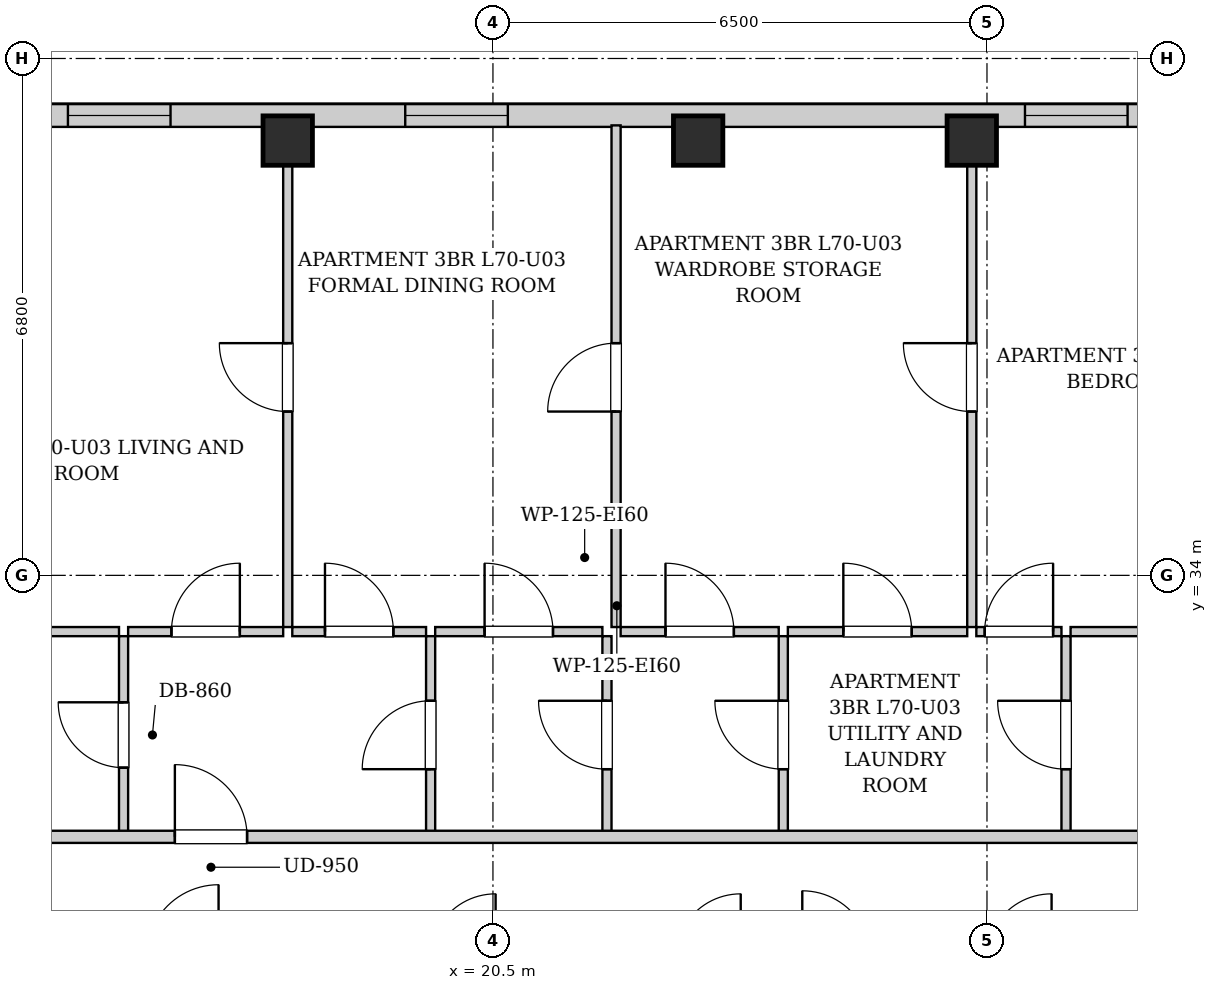
"""IFC4 building model, lengths in metres.
Left out: names, types, materials, properties, quantities, classifications, styles, units other than length and angle.
Written with IfcOpenShell. Run it as: python <this file> out.ifc"""

import sys

from ifc_helpers import new_model, si_unit, direction, frame, frame_2d, origin, origin_2d, place, context, subcontext, project, spatial, rectangle, extrude, element, fill, save


model = new_model("IFC4")
c1 = context("Model", 3, precision=1e-05, world=origin(), true_north=direction((0.0, 1.0)))
c2 = subcontext(c1, "Body", "Model", "MODEL_VIEW")
j1 = project(units=[si_unit("LENGTHUNIT", "METRE"), si_unit("PLANEANGLEUNIT", "RADIAN")], contexts=[c1])
p1 = place(None, origin())
s1 = spatial("IfcSite", under=j1, at=p1, CompositionType="ELEMENT")
p2 = place(p1, origin())
s2 = spatial("IfcBuilding", under=s1, at=p2, CompositionType="ELEMENT")
p3 = place(p2, frame((0.0, 0.0, 241.1)))
s3 = spatial("IfcBuildingStorey", under=s2, at=p3, CompositionType="ELEMENT", Elevation=241.1)
for number, where, z_axis, x_axis in (
    (1, (17.8, 39.72, 0.0), (0.0, 0.0, 1.0), (1.0, 0.0, 0.0)),
    (2, (23.2, 39.72, 0.0), (0.0, 0.0, 1.0), (1.0, 0.0, 0.0)),
    (3, (26.8, 39.72, 0.0), (0.0, 0.0, 1.0), (1.0, 0.0, 0.0)),
):
    element("IfcColumn", number, at=place(p3, frame(where, z_axis=z_axis, x_axis=x_axis)), inside=s3, PredefinedType="COLUMN", context=c2, shape_type="SweptSolid", body=[
        extrude(rectangle(XDim=0.65, YDim=0.65, at=origin_2d()), origin(), (0.0, 0.0, 1.0), 3.4),
    ])
p4 = place(p3, frame((13.1, 40.05, 0.0), z_axis=(0.0, 0.0, 1.0), x_axis=(1.0, 0.0, 0.0)))
e4 = element("IfcWall", 4, at=p4, inside=s3, PredefinedType="SOLIDWALL", context=c2, shape_type="SweptSolid", body=[
    extrude(rectangle(XDim=16.4, YDim=0.3, at=frame_2d((8.2, 0.0))), origin(), (0.0, 0.0, 1.0), 3.14),
])
p5 = place(p4, frame((1.808, 0.0, 0.55)))
e5 = element("IfcOpeningElement", 5, at=p5, cuts=e4, PredefinedType="OPENING", context=c2, shape_type="SweptSolid", body=[
    extrude(rectangle(XDim=1.35, YDim=1.2, at=frame_2d((0.675, 0.6))), frame((0.0, 0.16, 0.0), z_axis=(0.0, -1.0, 0.0), x_axis=(1.0, 0.0, 0.0)), (0.0, 0.0, 1.0), 0.32),
])
p6 = place(p4, frame((6.246, 0.0, 0.55)))
e6 = element("IfcOpeningElement", 6, at=p6, cuts=e4, PredefinedType="OPENING", context=c2, shape_type="SweptSolid", body=[
    extrude(rectangle(XDim=1.35, YDim=1.2, at=frame_2d((0.675, 0.6))), frame((0.0, 0.16, 0.0), z_axis=(0.0, -1.0, 0.0), x_axis=(1.0, 0.0, 0.0)), (0.0, 0.0, 1.0), 0.32),
])
p7 = place(p4, frame((14.4, 0.0, 0.55)))
e7 = element("IfcOpeningElement", 7, at=p7, cuts=e4, PredefinedType="OPENING", context=c2, shape_type="SweptSolid", body=[
    extrude(rectangle(XDim=1.35, YDim=1.2, at=frame_2d((0.675, 0.6))), frame((0.0, 0.16, 0.0), z_axis=(0.0, -1.0, 0.0), x_axis=(1.0, 0.0, 0.0)), (0.0, 0.0, 1.0), 0.32),
])
p8 = place(p3, frame((15.64, 30.6, 0.0), z_axis=(0.0, 0.0, 1.0), x_axis=(0.0, 1.0, 0.0)))
e8 = element("IfcWall", 8, at=p8, inside=s3, PredefinedType="PARTITIONING", context=c2, shape_type="SweptSolid", body=[
    extrude(rectangle(XDim=2.6, YDim=0.12, at=frame_2d((1.3, 0.0))), origin(), (0.0, 0.0, 1.0), 3.14),
])
p9 = place(p8, frame((0.87, 0.0, 0.0)))
e9 = element("IfcOpeningElement", 9, at=p9, cuts=e8, PredefinedType="OPENING", context=c2, shape_type="SweptSolid", body=[
    extrude(rectangle(XDim=0.86, YDim=2.05, at=frame_2d((0.43, 1.025))), frame((0.0, 0.07, 0.0), z_axis=(0.0, -1.0, 0.0), x_axis=(1.0, 0.0, 0.0)), (0.0, 0.0, 1.0), 0.14),
])
p10 = place(p3, frame((13.18, 33.26, 0.0), z_axis=(0.0, 0.0, 1.0), x_axis=(1.0, 0.0, 0.0)))
e10 = element("IfcWall", 10, at=p10, inside=s3, PredefinedType="PARTITIONING", context=c2, shape_type="SweptSolid", body=[
    extrude(rectangle(XDim=2.4, YDim=0.12, at=frame_2d((1.2, 0.0))), origin(), (0.0, 0.0, 1.0), 3.14),
])
p11 = place(p3, frame((19.68, 30.6, 0.0), z_axis=(0.0, 0.0, 1.0), x_axis=(0.0, 1.0, 0.0)))
e11 = element("IfcWall", 11, at=p11, inside=s3, PredefinedType="PARTITIONING", context=c2, shape_type="SweptSolid", body=[
    extrude(rectangle(XDim=2.6, YDim=0.12, at=frame_2d((1.3, 0.0))), origin(), (0.0, 0.0, 1.0), 3.14),
])
p12 = place(p11, frame((0.85, 0.0, 0.0)))
e12 = element("IfcOpeningElement", 12, at=p12, cuts=e11, PredefinedType="OPENING", context=c2, shape_type="SweptSolid", body=[
    extrude(rectangle(XDim=0.9, YDim=2.05, at=frame_2d((0.45, 1.025))), frame((0.0, 0.07, 0.0), z_axis=(0.0, -1.0, 0.0), x_axis=(1.0, 0.0, 0.0)), (0.0, 0.0, 1.0), 0.14),
])
p13 = place(p3, frame((15.7, 33.26, 0.0), z_axis=(0.0, 0.0, 1.0), x_axis=(1.0, 0.0, 0.0)))
e13 = element("IfcWall", 13, at=p13, inside=s3, PredefinedType="PARTITIONING", context=c2, shape_type="SweptSolid", body=[
    extrude(rectangle(XDim=2.04, YDim=0.12, at=frame_2d((1.02, 0.0))), origin(), (0.0, 0.0, 1.0), 3.14),
])
p14 = place(p13, frame((0.57, 0.0, 0.0)))
e14 = element("IfcOpeningElement", 14, at=p14, cuts=e13, PredefinedType="OPENING", context=c2, shape_type="SweptSolid", body=[
    extrude(rectangle(XDim=0.9, YDim=2.05, at=frame_2d((0.45, 1.025))), frame((0.0, 0.07, 0.0), z_axis=(0.0, -1.0, 0.0), x_axis=(1.0, 0.0, 0.0)), (0.0, 0.0, 1.0), 0.14),
])
p15 = place(p3, frame((17.86, 33.26, 0.0), z_axis=(0.0, 0.0, 1.0), x_axis=(1.0, 0.0, 0.0)))
e15 = element("IfcWall", 15, at=p15, inside=s3, PredefinedType="PARTITIONING", context=c2, shape_type="SweptSolid", body=[
    extrude(rectangle(XDim=1.76, YDim=0.12, at=frame_2d((0.88, 0.0))), origin(), (0.0, 0.0, 1.0), 3.14),
])
p16 = place(p15, frame((0.43, 0.0, 0.0)))
e16 = element("IfcOpeningElement", 16, at=p16, cuts=e15, PredefinedType="OPENING", context=c2, shape_type="SweptSolid", body=[
    extrude(rectangle(XDim=0.9, YDim=2.05, at=frame_2d((0.45, 1.025))), frame((0.0, 0.07, 0.0), z_axis=(0.0, -1.0, 0.0), x_axis=(1.0, 0.0, 0.0)), (0.0, 0.0, 1.0), 0.14),
])
p17 = place(p3, frame((22.0, 30.6, 0.0), z_axis=(0.0, 0.0, 1.0), x_axis=(0.0, 1.0, 0.0)))
e17 = element("IfcWall", 17, at=p17, inside=s3, PredefinedType="PARTITIONING", context=c2, shape_type="SweptSolid", body=[
    extrude(rectangle(XDim=2.6, YDim=0.12, at=frame_2d((1.3, 0.0))), origin(), (0.0, 0.0, 1.0), 3.14),
])
p18 = place(p17, frame((0.85, 0.0, 0.0)))
e18 = element("IfcOpeningElement", 18, at=p18, cuts=e17, PredefinedType="OPENING", context=c2, shape_type="SweptSolid", body=[
    extrude(rectangle(XDim=0.9, YDim=2.05, at=frame_2d((0.45, 1.025))), frame((0.0, 0.07, 0.0), z_axis=(0.0, -1.0, 0.0), x_axis=(1.0, 0.0, 0.0)), (0.0, 0.0, 1.0), 0.14),
])
p19 = place(p3, frame((19.74, 33.26, 0.0), z_axis=(0.0, 0.0, 1.0), x_axis=(1.0, 0.0, 0.0)))
e19 = element("IfcWall", 19, at=p19, inside=s3, PredefinedType="PARTITIONING", context=c2, shape_type="SweptSolid", body=[
    extrude(rectangle(XDim=2.2, YDim=0.12, at=frame_2d((1.1, 0.0))), origin(), (0.0, 0.0, 1.0), 3.14),
])
p20 = place(p19, frame((0.65, 0.0, 0.0)))
e20 = element("IfcOpeningElement", 20, at=p20, cuts=e19, PredefinedType="OPENING", context=c2, shape_type="SweptSolid", body=[
    extrude(rectangle(XDim=0.9, YDim=2.05, at=frame_2d((0.45, 1.025))), frame((0.0, 0.07, 0.0), z_axis=(0.0, -1.0, 0.0), x_axis=(1.0, 0.0, 0.0)), (0.0, 0.0, 1.0), 0.14),
])
p21 = place(p3, frame((24.32, 30.6, 0.0), z_axis=(0.0, 0.0, 1.0), x_axis=(0.0, 1.0, 0.0)))
e21 = element("IfcWall", 21, at=p21, inside=s3, PredefinedType="PARTITIONING", context=c2, shape_type="SweptSolid", body=[
    extrude(rectangle(XDim=2.6, YDim=0.12, at=frame_2d((1.3, 0.0))), origin(), (0.0, 0.0, 1.0), 3.14),
])
p22 = place(p21, frame((0.85, 0.0, 0.0)))
e22 = element("IfcOpeningElement", 22, at=p22, cuts=e21, PredefinedType="OPENING", context=c2, shape_type="SweptSolid", body=[
    extrude(rectangle(XDim=0.9, YDim=2.05, at=frame_2d((0.45, 1.025))), frame((0.0, 0.07, 0.0), z_axis=(0.0, -1.0, 0.0), x_axis=(1.0, 0.0, 0.0)), (0.0, 0.0, 1.0), 0.14),
])
p23 = place(p3, frame((22.18, 33.26, 0.0), z_axis=(0.0, 0.0, 1.0), x_axis=(1.0, 0.0, 0.0)))
e23 = element("IfcWall", 23, at=p23, inside=s3, PredefinedType="PARTITIONING", context=c2, shape_type="SweptSolid", body=[
    extrude(rectangle(XDim=2.08, YDim=0.12, at=frame_2d((1.04, 0.0))), origin(), (0.0, 0.0, 1.0), 3.14),
])
p24 = place(p23, frame((0.59, 0.0, 0.0)))
e24 = element("IfcOpeningElement", 24, at=p24, cuts=e23, PredefinedType="OPENING", context=c2, shape_type="SweptSolid", body=[
    extrude(rectangle(XDim=0.9, YDim=2.05, at=frame_2d((0.45, 1.025))), frame((0.0, 0.07, 0.0), z_axis=(0.0, -1.0, 0.0), x_axis=(1.0, 0.0, 0.0)), (0.0, 0.0, 1.0), 0.14),
])
p25 = place(p3, frame((28.04, 30.6, 0.0), z_axis=(0.0, 0.0, 1.0), x_axis=(0.0, 1.0, 0.0)))
e25 = element("IfcWall", 25, at=p25, inside=s3, PredefinedType="PARTITIONING", context=c2, shape_type="SweptSolid", body=[
    extrude(rectangle(XDim=2.6, YDim=0.12, at=frame_2d((1.3, 0.0))), origin(), (0.0, 0.0, 1.0), 3.14),
])
p26 = place(p25, frame((0.85, 0.0, 0.0)))
e26 = element("IfcOpeningElement", 26, at=p26, cuts=e25, PredefinedType="OPENING", context=c2, shape_type="SweptSolid", body=[
    extrude(rectangle(XDim=0.9, YDim=2.05, at=frame_2d((0.45, 1.025))), frame((0.0, 0.07, 0.0), z_axis=(0.0, -1.0, 0.0), x_axis=(1.0, 0.0, 0.0)), (0.0, 0.0, 1.0), 0.14),
])
p27 = place(p3, frame((24.38, 33.26, 0.0), z_axis=(0.0, 0.0, 1.0), x_axis=(1.0, 0.0, 0.0)))
e27 = element("IfcWall", 27, at=p27, inside=s3, PredefinedType="PARTITIONING", context=c2, shape_type="SweptSolid", body=[
    extrude(rectangle(XDim=2.36, YDim=0.12, at=frame_2d((1.18, 0.0))), origin(), (0.0, 0.0, 1.0), 3.14),
])
p28 = place(p27, frame((0.73, 0.0, 0.0)))
e28 = element("IfcOpeningElement", 28, at=p28, cuts=e27, PredefinedType="OPENING", context=c2, shape_type="SweptSolid", body=[
    extrude(rectangle(XDim=0.9, YDim=2.05, at=frame_2d((0.45, 1.025))), frame((0.0, 0.07, 0.0), z_axis=(0.0, -1.0, 0.0), x_axis=(1.0, 0.0, 0.0)), (0.0, 0.0, 1.0), 0.14),
])
p29 = place(p3, frame((26.86, 33.26, 0.0), z_axis=(0.0, 0.0, 1.0), x_axis=(1.0, 0.0, 0.0)))
e29 = element("IfcWall", 29, at=p29, inside=s3, PredefinedType="PARTITIONING", context=c2, shape_type="SweptSolid", body=[
    extrude(rectangle(XDim=1.12, YDim=0.12, at=frame_2d((0.56, 0.0))), origin(), (0.0, 0.0, 1.0), 3.14),
])
p30 = place(p29, frame((0.11, 0.0, 0.0)))
e30 = element("IfcOpeningElement", 30, at=p30, cuts=e29, PredefinedType="OPENING", context=c2, shape_type="SweptSolid", body=[
    extrude(rectangle(XDim=0.9, YDim=2.05, at=frame_2d((0.45, 1.025))), frame((0.0, 0.07, 0.0), z_axis=(0.0, -1.0, 0.0), x_axis=(1.0, 0.0, 0.0)), (0.0, 0.0, 1.0), 0.14),
])
p31 = place(p3, frame((28.1, 33.26, 0.0), z_axis=(0.0, 0.0, 1.0), x_axis=(1.0, 0.0, 0.0)))
e31 = element("IfcWall", 31, at=p31, inside=s3, PredefinedType="PARTITIONING", context=c2, shape_type="SweptSolid", body=[
    extrude(rectangle(XDim=3.03, YDim=0.12, at=frame_2d((1.515, 0.0))), origin(), (0.0, 0.0, 1.0), 3.14),
])
p32 = place(p31, frame((1.065, 0.0, 0.0)))
e32 = element("IfcOpeningElement", 32, at=p32, cuts=e31, PredefinedType="OPENING", context=c2, shape_type="SweptSolid", body=[
    extrude(rectangle(XDim=0.9, YDim=2.05, at=frame_2d((0.45, 1.025))), frame((0.0, 0.07, 0.0), z_axis=(0.0, -1.0, 0.0), x_axis=(1.0, 0.0, 0.0)), (0.0, 0.0, 1.0), 0.14),
])
p33 = place(p3, frame((17.8, 33.32, 0.0), z_axis=(0.0, 0.0, 1.0), x_axis=(0.0, 1.0, 0.0)))
e33 = element("IfcWall", 33, at=p33, inside=s3, PredefinedType="PARTITIONING", context=c2, shape_type="SweptSolid", body=[
    extrude(rectangle(XDim=6.6, YDim=0.12, at=frame_2d((3.3, 0.0))), origin(), (0.0, 0.0, 1.0), 2.668),
])
p34 = place(p33, frame((2.835, 0.0, 0.0)))
e34 = element("IfcOpeningElement", 34, at=p34, cuts=e33, PredefinedType="OPENING", context=c2, shape_type="SweptSolid", body=[
    extrude(rectangle(XDim=0.9, YDim=2.05, at=frame_2d((0.45, 1.025))), frame((0.0, 0.07, 0.0), z_axis=(0.0, -1.0, 0.0), x_axis=(1.0, 0.0, 0.0)), (0.0, 0.0, 1.0), 0.14),
])
p35 = place(p3, frame((22.12, 33.32, 0.0), z_axis=(0.0, 0.0, 1.0), x_axis=(0.0, 1.0, 0.0)))
e35 = element("IfcWall", 35, at=p35, inside=s3, PredefinedType="PARTITIONING", context=c2, shape_type="SweptSolid", body=[
    extrude(rectangle(XDim=6.6, YDim=0.12, at=frame_2d((3.3, 0.0))), origin(), (0.0, 0.0, 1.0), 3.14),
])
p36 = place(p35, frame((2.835, 0.0, 0.0)))
e36 = element("IfcOpeningElement", 36, at=p36, cuts=e35, PredefinedType="OPENING", context=c2, shape_type="SweptSolid", body=[
    extrude(rectangle(XDim=0.9, YDim=2.05, at=frame_2d((0.45, 1.025))), frame((0.0, 0.07, 0.0), z_axis=(0.0, -1.0, 0.0), x_axis=(1.0, 0.0, 0.0)), (0.0, 0.0, 1.0), 0.14),
])
p37 = place(p3, frame((26.8, 33.32, 0.0), z_axis=(0.0, 0.0, 1.0), x_axis=(0.0, 1.0, 0.0)))
e37 = element("IfcWall", 37, at=p37, inside=s3, PredefinedType="PARTITIONING", context=c2, shape_type="SweptSolid", body=[
    extrude(rectangle(XDim=6.6, YDim=0.12, at=frame_2d((3.3, 0.0))), origin(), (0.0, 0.0, 1.0), 3.14),
])
p38 = place(p37, frame((2.835, 0.0, 0.0)))
e38 = element("IfcOpeningElement", 38, at=p38, cuts=e37, PredefinedType="OPENING", context=c2, shape_type="SweptSolid", body=[
    extrude(rectangle(XDim=0.9, YDim=2.05, at=frame_2d((0.45, 1.025))), frame((0.0, 0.07, 0.0), z_axis=(0.0, -1.0, 0.0), x_axis=(1.0, 0.0, 0.0)), (0.0, 0.0, 1.0), 0.14),
])
p39 = place(p3, frame((13.15, 30.56, 0.0), z_axis=(0.0, 0.0, 1.0), x_axis=(1.0, 0.0, 0.0)))
e39 = element("IfcWall", 39, at=p39, inside=s3, PredefinedType="PARTITIONING", context=c2, shape_type="SweptSolid", body=[
    extrude(rectangle(XDim=24.6, YDim=0.16, at=frame_2d((12.3, 0.0))), origin(), (0.0, 0.0, 1.0), 3.14),
])
p40 = place(p39, frame((3.165, 0.0, 0.0)))
e40 = element("IfcOpeningElement", 40, at=p40, cuts=e39, PredefinedType="OPENING", context=c2, shape_type="SweptSolid", body=[
    extrude(rectangle(XDim=0.95, YDim=2.1, at=frame_2d((0.475, 1.05))), frame((0.0, 0.09, 0.0), z_axis=(0.0, -1.0, 0.0), x_axis=(1.0, 0.0, 0.0)), (0.0, 0.0, 1.0), 0.18),
])
p41 = place(p9, origin())
e41 = element("IfcDoor", 41, at=p41, inside=s3, OperationType="SINGLE_SWING_RIGHT", PredefinedType="DOOR", context=c2, shape_type="SweptSolid", body=[
    extrude(rectangle(XDim=0.86, YDim=2.05, at=frame_2d((0.43, 1.025))), frame((0.0, 0.025, 0.0), z_axis=(0.0, -1.0, 0.0), x_axis=(1.0, 0.0, 0.0)), (0.0, 0.0, 1.0), 0.05),
])
fill(e9, e41)
p42 = place(p12, origin())
e42 = element("IfcDoor", 42, at=p42, inside=s3, OperationType="SINGLE_SWING_LEFT", PredefinedType="DOOR", context=c2, shape_type="SweptSolid", body=[
    extrude(rectangle(XDim=0.9, YDim=2.05, at=frame_2d((0.45, 1.025))), frame((0.0, 0.025, 0.0), z_axis=(0.0, -1.0, 0.0), x_axis=(1.0, 0.0, 0.0)), (0.0, 0.0, 1.0), 0.05),
])
fill(e12, e42)
p43 = place(p14, origin())
e43 = element("IfcDoor", 43, at=p43, inside=s3, OperationType="SINGLE_SWING_RIGHT", PredefinedType="DOOR", context=c2, shape_type="SweptSolid", body=[
    extrude(rectangle(XDim=0.9, YDim=2.05, at=frame_2d((0.45, 1.025))), frame((0.0, 0.025, 0.0), z_axis=(0.0, -1.0, 0.0), x_axis=(1.0, 0.0, 0.0)), (0.0, 0.0, 1.0), 0.05),
])
fill(e14, e43)
p44 = place(p16, origin())
e44 = element("IfcDoor", 44, at=p44, inside=s3, OperationType="SINGLE_SWING_LEFT", PredefinedType="DOOR", context=c2, shape_type="SweptSolid", body=[
    extrude(rectangle(XDim=0.9, YDim=2.05, at=frame_2d((0.45, 1.025))), frame((0.0, 0.025, 0.0), z_axis=(0.0, -1.0, 0.0), x_axis=(1.0, 0.0, 0.0)), (0.0, 0.0, 1.0), 0.05),
])
fill(e16, e44)
p45 = place(p18, origin())
e45 = element("IfcDoor", 45, at=p45, inside=s3, OperationType="SINGLE_SWING_RIGHT", PredefinedType="DOOR", context=c2, shape_type="SweptSolid", body=[
    extrude(rectangle(XDim=0.9, YDim=2.05, at=frame_2d((0.45, 1.025))), frame((0.0, 0.025, 0.0), z_axis=(0.0, -1.0, 0.0), x_axis=(1.0, 0.0, 0.0)), (0.0, 0.0, 1.0), 0.05),
])
fill(e18, e45)
p46 = place(p20, origin())
e46 = element("IfcDoor", 46, at=p46, inside=s3, OperationType="SINGLE_SWING_LEFT", PredefinedType="DOOR", context=c2, shape_type="SweptSolid", body=[
    extrude(rectangle(XDim=0.9, YDim=2.05, at=frame_2d((0.45, 1.025))), frame((0.0, 0.025, 0.0), z_axis=(0.0, -1.0, 0.0), x_axis=(1.0, 0.0, 0.0)), (0.0, 0.0, 1.0), 0.05),
])
fill(e20, e46)
p47 = place(p22, origin())
e47 = element("IfcDoor", 47, at=p47, inside=s3, OperationType="SINGLE_SWING_RIGHT", PredefinedType="DOOR", context=c2, shape_type="SweptSolid", body=[
    extrude(rectangle(XDim=0.9, YDim=2.05, at=frame_2d((0.45, 1.025))), frame((0.0, 0.025, 0.0), z_axis=(0.0, -1.0, 0.0), x_axis=(1.0, 0.0, 0.0)), (0.0, 0.0, 1.0), 0.05),
])
fill(e22, e47)
p48 = place(p24, origin())
e48 = element("IfcDoor", 48, at=p48, inside=s3, OperationType="SINGLE_SWING_LEFT", PredefinedType="DOOR", context=c2, shape_type="SweptSolid", body=[
    extrude(rectangle(XDim=0.9, YDim=2.05, at=frame_2d((0.45, 1.025))), frame((0.0, 0.025, 0.0), z_axis=(0.0, -1.0, 0.0), x_axis=(1.0, 0.0, 0.0)), (0.0, 0.0, 1.0), 0.05),
])
fill(e24, e48)
p49 = place(p26, origin())
e49 = element("IfcDoor", 49, at=p49, inside=s3, OperationType="SINGLE_SWING_RIGHT", PredefinedType="DOOR", context=c2, shape_type="SweptSolid", body=[
    extrude(rectangle(XDim=0.9, YDim=2.05, at=frame_2d((0.45, 1.025))), frame((0.0, 0.025, 0.0), z_axis=(0.0, -1.0, 0.0), x_axis=(1.0, 0.0, 0.0)), (0.0, 0.0, 1.0), 0.05),
])
fill(e26, e49)
p50 = place(p28, origin())
e50 = element("IfcDoor", 50, at=p50, inside=s3, OperationType="SINGLE_SWING_LEFT", PredefinedType="DOOR", context=c2, shape_type="SweptSolid", body=[
    extrude(rectangle(XDim=0.9, YDim=2.05, at=frame_2d((0.45, 1.025))), frame((0.0, 0.025, 0.0), z_axis=(0.0, -1.0, 0.0), x_axis=(1.0, 0.0, 0.0)), (0.0, 0.0, 1.0), 0.05),
])
fill(e28, e50)
p51 = place(p30, origin())
e51 = element("IfcDoor", 51, at=p51, inside=s3, OperationType="SINGLE_SWING_RIGHT", PredefinedType="DOOR", context=c2, shape_type="SweptSolid", body=[
    extrude(rectangle(XDim=0.9, YDim=2.05, at=frame_2d((0.45, 1.025))), frame((0.0, 0.025, 0.0), z_axis=(0.0, -1.0, 0.0), x_axis=(1.0, 0.0, 0.0)), (0.0, 0.0, 1.0), 0.05),
])
fill(e30, e51)
p52 = place(p34, origin())
e52 = element("IfcDoor", 52, at=p52, inside=s3, OperationType="SINGLE_SWING_RIGHT", PredefinedType="DOOR", context=c2, shape_type="SweptSolid", body=[
    extrude(rectangle(XDim=0.9, YDim=2.05, at=frame_2d((0.45, 1.025))), frame((0.0, 0.025, 0.0), z_axis=(0.0, -1.0, 0.0), x_axis=(1.0, 0.0, 0.0)), (0.0, 0.0, 1.0), 0.05),
])
fill(e34, e52)
p53 = place(p36, origin())
e53 = element("IfcDoor", 53, at=p53, inside=s3, OperationType="SINGLE_SWING_LEFT", PredefinedType="DOOR", context=c2, shape_type="SweptSolid", body=[
    extrude(rectangle(XDim=0.9, YDim=2.05, at=frame_2d((0.45, 1.025))), frame((0.0, 0.025, 0.0), z_axis=(0.0, -1.0, 0.0), x_axis=(1.0, 0.0, 0.0)), (0.0, 0.0, 1.0), 0.05),
])
fill(e36, e53)
p54 = place(p38, origin())
e54 = element("IfcDoor", 54, at=p54, inside=s3, OperationType="SINGLE_SWING_RIGHT", PredefinedType="DOOR", context=c2, shape_type="SweptSolid", body=[
    extrude(rectangle(XDim=0.9, YDim=2.05, at=frame_2d((0.45, 1.025))), frame((0.0, 0.025, 0.0), z_axis=(0.0, -1.0, 0.0), x_axis=(1.0, 0.0, 0.0)), (0.0, 0.0, 1.0), 0.05),
])
fill(e38, e54)
p55 = place(p40, origin())
e55 = element("IfcDoor", 55, at=p55, inside=s3, OperationType="SINGLE_SWING_LEFT", PredefinedType="DOOR", context=c2, shape_type="SweptSolid", body=[
    extrude(rectangle(XDim=0.95, YDim=2.1, at=frame_2d((0.475, 1.05))), frame((0.0, 0.025, 0.0), z_axis=(0.0, -1.0, 0.0), x_axis=(1.0, 0.0, 0.0)), (0.0, 0.0, 1.0), 0.05),
])
fill(e40, e55)
p56 = place(p5, origin())
e56 = element("IfcWindow", 56, at=p56, inside=s3, PartitioningType="SINGLE_PANEL", PredefinedType="WINDOW", context=c2, shape_type="SweptSolid", body=[
    extrude(rectangle(XDim=1.35, YDim=1.2, at=frame_2d((0.675, 0.6))), frame((0.0, 0.03, 0.0), z_axis=(0.0, -1.0, 0.0), x_axis=(1.0, 0.0, 0.0)), (0.0, 0.0, 1.0), 0.06),
])
fill(e5, e56)
p57 = place(p6, origin())
e57 = element("IfcWindow", 57, at=p57, inside=s3, PartitioningType="SINGLE_PANEL", PredefinedType="WINDOW", context=c2, shape_type="SweptSolid", body=[
    extrude(rectangle(XDim=1.35, YDim=1.2, at=frame_2d((0.675, 0.6))), frame((0.0, 0.03, 0.0), z_axis=(0.0, -1.0, 0.0), x_axis=(1.0, 0.0, 0.0)), (0.0, 0.0, 1.0), 0.06),
])
fill(e6, e57)
p58 = place(p7, origin())
e58 = element("IfcWindow", 58, at=p58, inside=s3, PartitioningType="SINGLE_PANEL", PredefinedType="WINDOW", context=c2, shape_type="SweptSolid", body=[
    extrude(rectangle(XDim=1.35, YDim=1.2, at=frame_2d((0.675, 0.6))), frame((0.0, 0.03, 0.0), z_axis=(0.0, -1.0, 0.0), x_axis=(1.0, 0.0, 0.0)), (0.0, 0.0, 1.0), 0.06),
])
fill(e7, e58)
save(model, sys.argv[1])
